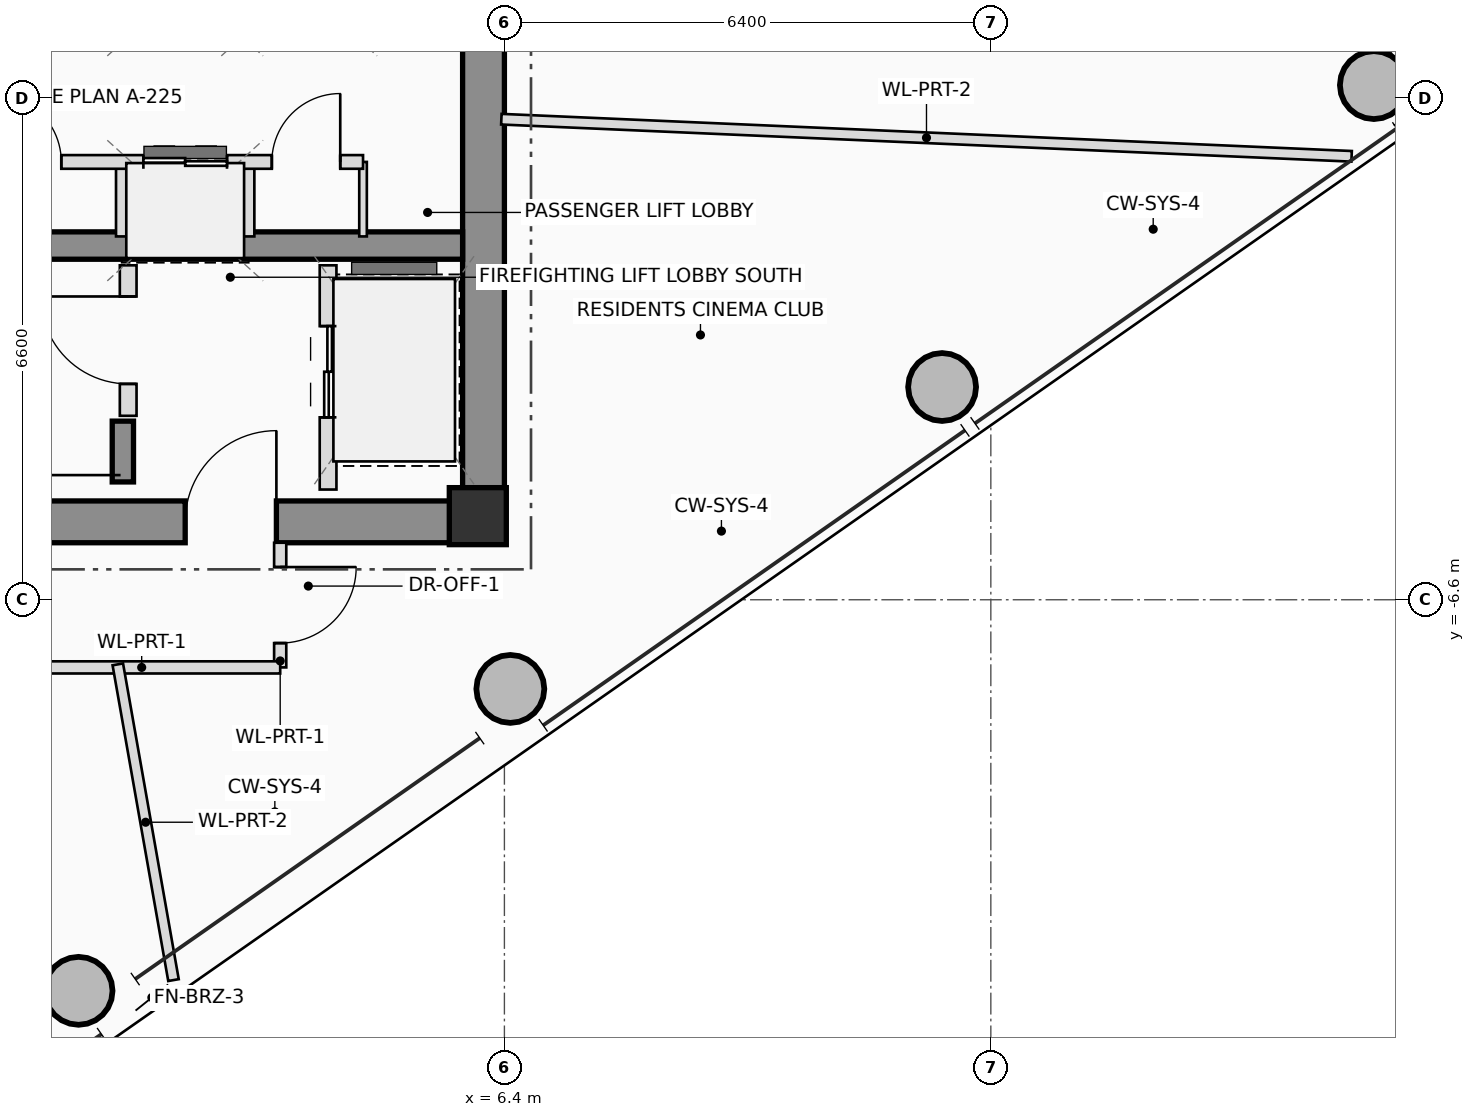
"""IFC4 building model, lengths in metres.
Left out: names, types, materials, properties, quantities, classifications, styles, units other than length and angle.
Written with IfcOpenShell. Run it as: python <this file> out.ifc"""

import sys

from ifc_helpers import new_model, si_unit, direction, frame, frame_2d, origin, origin_2d, place, context, subcontext, project, spatial, rectangle, hollow_circle, extrude, source, transform, mapped, element, fill, save


model = new_model("IFC4")
c1 = context("Model", 3, precision=1e-05, world=origin(), true_north=direction((0.0, 1.0)))
c2 = subcontext(c1, "Body", "Model", "MODEL_VIEW")
j1 = project(units=[si_unit("LENGTHUNIT", "METRE"), si_unit("PLANEANGLEUNIT", "RADIAN")], contexts=[c1])
p1 = place(None, origin())
s1 = spatial("IfcSite", under=j1, at=p1, CompositionType="ELEMENT")
p2 = place(p1, origin())
s2 = spatial("IfcBuilding", under=s1, at=p2, CompositionType="ELEMENT")
p3 = place(p2, frame((0.0, 0.0, 274.55)))
s3 = spatial("IfcBuildingStorey", under=s2, at=p3, CompositionType="ELEMENT", Elevation=274.55)
m1 = source(origin(), c2, "Body", "SweptSolid", [
    extrude(rectangle(XDim=0.75, YDim=0.75, at=origin_2d()), origin(), (0.0, 0.0, 1.0), 3.4),
])
p4 = place(p3, frame((6.05, -5.5, 0.0), z_axis=(0.0, 0.0, 1.0), x_axis=(1.0, 0.0, 0.0)))
e1 = element("IfcColumn", 1, at=p4, inside=s3, PredefinedType="COLUMN", context=c2, shape_type="MappedRepresentation", body=[
    mapped(m1, transform((0.0, 0.0, 0.0), scale=1.0)),
])
p5 = place(p3, frame((-6.4, -5.575, 0.0), z_axis=(0.0, 0.0, 1.0), x_axis=(1.0, 0.0, 0.0)))
e2 = element("IfcWall", 2, at=p5, inside=s3, PredefinedType="SHEAR", context=c2, shape_type="SweptSolid", body=[
    extrude(rectangle(XDim=12.8, YDim=0.55, at=frame_2d((6.4, 0.0))), origin(), (0.0, 0.0, 1.0), 3.4),
])
p6 = place(p5, frame((8.6, 0.0, 0.0)))
e3 = element("IfcOpeningElement", 3, at=p6, cuts=e2, PredefinedType="OPENING", context=c2, shape_type="SweptSolid", body=[
    extrude(rectangle(XDim=1.2, YDim=2.2, at=frame_2d((0.6, 1.1))), frame((0.0, 0.285, 0.0), z_axis=(0.0, -1.0, 0.0), x_axis=(1.0, 0.0, 0.0)), (0.0, 0.0, 1.0), 0.57),
])
p7 = place(p3, frame((6.125, -5.3, 0.0), z_axis=(0.0, 0.0, 1.0), x_axis=(0.0, 1.0, 0.0)))
e4 = element("IfcWall", 4, at=p7, inside=s3, PredefinedType="SHEAR", context=c2, shape_type="SweptSolid", body=[
    extrude(rectangle(XDim=10.6, YDim=0.55, at=frame_2d((5.3, 0.0))), origin(), (0.0, 0.0, 1.0), 3.4),
])
p8 = place(p3, frame((-5.85, -1.94, 0.0), z_axis=(0.0, 0.0, 1.0), x_axis=(1.0, 0.0, 0.0)))
e5 = element("IfcWall", 5, at=p8, inside=s3, PredefinedType="SHEAR", context=c2, shape_type="SweptSolid", body=[
    extrude(rectangle(XDim=11.7, YDim=0.36, at=frame_2d((5.85, 0.0))), origin(), (0.0, 0.0, 1.0), 3.4),
])
p9 = place(p3, frame((1.38, -5.05, 0.0), z_axis=(0.0, 0.0, 1.0), x_axis=(0.0, 1.0, 0.0)))
e6 = element("IfcWall", 6, at=p9, inside=s3, PredefinedType="SHEAR", context=c2, shape_type="SweptSolid", body=[
    extrude(rectangle(XDim=0.8, YDim=0.28, at=frame_2d((0.4, 0.0))), origin(), (0.0, 0.0, 1.0), 3.4),
])
m2 = source(origin(), c2, "Body", "SweptSolid", [
    extrude(hollow_circle(Radius=0.45, WallThickness=0.032, at=origin_2d()), origin(), (0.0, 0.0, 1.0), 3.4),
])
for number, where, z_axis, x_axis in (
    (7, (0.797, -11.745, 0.0), (0.0, 0.0, 1.0), (1.0, 0.0, 0.0)),
    (8, (6.478, -7.773, 0.0), (0.0, 0.0, 1.0), (1.0, 0.0, 0.0)),
    (9, (12.159, -3.801, 0.0), (0.0, 0.0, 1.0), (1.0, 0.0, 0.0)),
    (10, (17.84, 0.171, 0.0), (0.0, 0.0, 1.0), (1.0, 0.0, 0.0)),
):
    element("IfcColumn", number, at=place(p3, frame(where, z_axis=z_axis, x_axis=x_axis)), inside=s3, PredefinedType="COLUMN", context=c2, shape_type="MappedRepresentation", body=[
        mapped(m2, transform((0.0, 0.0, 0.0), scale=1.0)),
    ])
p10 = place(p3, frame((1.45, -4.18, 0.0), z_axis=(0.0, 0.0, 1.0), x_axis=(0.0, 1.0, 0.0)))
e11 = element("IfcWall", 11, at=p10, inside=s3, PredefinedType="PLUMBINGWALL", context=c2, shape_type="SweptSolid", body=[
    extrude(rectangle(XDim=1.98, YDim=0.22, at=frame_2d((0.99, 0.0))), origin(), (0.0, 0.0, 1.0), 3.2),
])
p11 = place(p10, frame((0.42, 0.0, 0.0)))
e12 = element("IfcOpeningElement", 12, at=p11, cuts=e11, PredefinedType="OPENING", context=c2, shape_type="SweptSolid", body=[
    extrude(rectangle(XDim=1.15, YDim=2.15, at=frame_2d((0.575, 1.075))), frame((0.0, 0.12, 0.0), z_axis=(0.0, -1.0, 0.0), x_axis=(1.0, 0.0, 0.0)), (0.0, 0.0, 1.0), 0.24),
])
p12 = place(p3, frame((4.08, -5.15, 0.0), z_axis=(0.0, 0.0, 1.0), x_axis=(0.0, 1.0, 0.0)))
e13 = element("IfcWall", 13, at=p12, inside=s3, PredefinedType="PLUMBINGWALL", context=c2, shape_type="SweptSolid", body=[
    extrude(rectangle(XDim=2.95, YDim=0.22, at=frame_2d((1.475, 0.0))), origin(), (0.0, 0.0, 1.0), 3.2),
])
p13 = place(p12, frame((0.95, 0.0, 0.0)))
e14 = element("IfcOpeningElement", 14, at=p13, cuts=e13, PredefinedType="OPENING", context=c2, shape_type="SweptSolid", body=[
    extrude(rectangle(XDim=1.2, YDim=2.25, at=frame_2d((0.6, 1.125))), frame((0.0, 0.12, 0.0), z_axis=(0.0, -1.0, 0.0), x_axis=(1.0, 0.0, 0.0)), (0.0, 0.0, 1.0), 0.24),
])
for number, where, z_axis, x_axis in (
    (15, (1.38, -1.82, 0.0), (0.0, 0.0, 1.0), (0.0, 1.0, 0.0)),
    (16, (3.02, -1.82, 0.0), (0.0, 0.0, 1.0), (0.0, 1.0, 0.0)),
):
    element("IfcWall", number, at=place(p3, frame(where, z_axis=z_axis, x_axis=x_axis)), inside=s3, PredefinedType="PLUMBINGWALL", context=c2, shape_type="SweptSolid", body=[
        extrude(rectangle(XDim=0.98, YDim=0.18, at=frame_2d((0.49, 0.0))), origin(), (0.0, 0.0, 1.0), 3.2),
    ])
p14 = place(p3, frame((4.54, -1.82, 0.0), z_axis=(0.0, 0.0, 1.0), x_axis=(0.0, 1.0, 0.0)))
e17 = element("IfcWall", 17, at=p14, inside=s3, PredefinedType="PARTITIONING", context=c2, shape_type="SweptSolid", body=[
    extrude(rectangle(XDim=0.98, YDim=0.1, at=frame_2d((0.49, 0.0))), origin(), (0.0, 0.0, 1.0), 3.2),
])
p15 = place(p3, frame((-5.68, -0.84, 0.0), z_axis=(0.0, 0.0, 1.0), x_axis=(1.0, 0.0, 0.0)))
e18 = element("IfcWall", 18, at=p15, inside=s3, PredefinedType="PLUMBINGWALL", context=c2, shape_type="SweptSolid", body=[
    extrude(rectangle(XDim=10.22, YDim=0.18, at=frame_2d((5.11, 0.0))), origin(), (0.0, 0.0, 1.0), 3.2),
])
p16 = place(p15, frame((1.88, 0.0, 0.0)))
e19 = element("IfcOpeningElement", 19, at=p16, cuts=e18, PredefinedType="OPENING", context=c2, shape_type="SweptSolid", body=[
    extrude(rectangle(XDim=0.9, YDim=2.05, at=frame_2d((0.45, 1.025))), frame((0.0, 0.1, 0.0), z_axis=(0.0, -1.0, 0.0), x_axis=(1.0, 0.0, 0.0)), (0.0, 0.0, 1.0), 0.2),
])
p17 = place(p15, frame((5.35, 0.0, 0.0)))
e20 = element("IfcOpeningElement", 20, at=p17, cuts=e18, PredefinedType="OPENING", context=c2, shape_type="SweptSolid", body=[
    extrude(rectangle(XDim=0.9, YDim=2.05, at=frame_2d((0.45, 1.025))), frame((0.0, 0.1, 0.0), z_axis=(0.0, -1.0, 0.0), x_axis=(1.0, 0.0, 0.0)), (0.0, 0.0, 1.0), 0.2),
])
p18 = place(p15, frame((7.33, 0.0, 0.0)))
e21 = element("IfcOpeningElement", 21, at=p18, cuts=e18, PredefinedType="OPENING", context=c2, shape_type="SweptSolid", body=[
    extrude(rectangle(XDim=1.1, YDim=2.2, at=frame_2d((0.55, 1.1))), frame((0.0, 0.1, 0.0), z_axis=(0.0, -1.0, 0.0), x_axis=(1.0, 0.0, 0.0)), (0.0, 0.0, 1.0), 0.2),
])
p19 = place(p15, frame((9.02, 0.0, 0.0)))
e22 = element("IfcOpeningElement", 22, at=p19, cuts=e18, PredefinedType="OPENING", context=c2, shape_type="SweptSolid", body=[
    extrude(rectangle(XDim=0.9, YDim=2.05, at=frame_2d((0.45, 1.025))), frame((0.0, 0.1, 0.0), z_axis=(0.0, -1.0, 0.0), x_axis=(1.0, 0.0, 0.0)), (0.0, 0.0, 1.0), 0.2),
])
p20 = place(p3, frame((3.45, -5.85, 0.0), z_axis=(0.0, 0.0, 1.0), x_axis=(0.0, -1.0, 0.0)))
e23 = element("IfcWall", 23, at=p20, inside=s3, PredefinedType="PARTITIONING", context=c2, shape_type="SweptSolid", body=[
    extrude(rectangle(XDim=1.64, YDim=0.16, at=frame_2d((0.82, 0.0))), origin(), (0.0, 0.0, 1.0), 3.2),
])
p21 = place(p20, frame((0.32, 0.0, 0.0)))
e24 = element("IfcOpeningElement", 24, at=p21, cuts=e23, PredefinedType="OPENING", context=c2, shape_type="SweptSolid", body=[
    extrude(rectangle(XDim=1.0, YDim=2.25, at=frame_2d((0.5, 1.125))), frame((0.0, 0.09, 0.0), z_axis=(0.0, -1.0, 0.0), x_axis=(1.0, 0.0, 0.0)), (0.0, 0.0, 1.0), 0.18),
])
p22 = place(p3, frame((3.45, -7.49, 0.0), z_axis=(0.0, 0.0, 1.0), x_axis=(-1.0, 0.0, 0.0)))
e25 = element("IfcWall", 25, at=p22, inside=s3, PredefinedType="PARTITIONING", context=c2, shape_type="SweptSolid", body=[
    extrude(rectangle(XDim=9.81, YDim=0.16, at=frame_2d((4.905, 0.0))), origin(), (0.0, 0.0, 1.0), 2.605),
])
p23 = place(p22, frame((3.795, 0.0, 0.0)))
e26 = element("IfcOpeningElement", 26, at=p23, cuts=e25, PredefinedType="OPENING", context=c2, shape_type="SweptSolid", body=[
    extrude(rectangle(XDim=1.0, YDim=2.25, at=frame_2d((0.5, 1.125))), frame((0.0, 0.09, 0.0), z_axis=(0.0, -1.0, 0.0), x_axis=(1.0, 0.0, 0.0)), (0.0, 0.0, 1.0), 0.18),
])
p24 = place(p22, frame((7.553, 0.0, 0.0)))
e27 = element("IfcOpeningElement", 27, at=p24, cuts=e25, PredefinedType="OPENING", context=c2, shape_type="SweptSolid", body=[
    extrude(rectangle(XDim=1.0, YDim=2.25, at=frame_2d((0.5, 1.125))), frame((0.0, 0.09, 0.0), z_axis=(0.0, -1.0, 0.0), x_axis=(1.0, 0.0, 0.0)), (0.0, 0.0, 1.0), 0.18),
])
p25 = place(p3, frame((6.36, -0.278, 0.0), z_axis=(0.0, 0.0, 1.0), x_axis=(0.999047788643, -0.043629302162, 0.0)))
e28 = element("IfcWall", 28, at=p25, inside=s3, PredefinedType="PARTITIONING", context=c2, shape_type="SweptSolid", body=[
    extrude(rectangle(XDim=11.197, YDim=0.14, at=frame_2d((5.599, 0.0))), origin(), (0.0, 0.0, 1.0), 2.765),
])
p26 = place(p3, frame((1.314, -7.45, 0.0), z_axis=(0.0, 0.0, 1.0), x_axis=(0.17364664795, -0.984808022741, 0.0)))
e29 = element("IfcWall", 29, at=p26, inside=s3, PredefinedType="PARTITIONING", context=c2, shape_type="SweptSolid", body=[
    extrude(rectangle(XDim=4.218, YDim=0.14, at=frame_2d((2.109, 0.0))), origin(), (0.0, 0.0, 1.0), 2.605),
])
p27 = place(p6, origin())
e30 = element("IfcDoor", 30, at=p27, inside=s3, OperationType="SINGLE_SWING_RIGHT", PredefinedType="DOOR", context=c2, shape_type="SweptSolid", body=[
    extrude(rectangle(XDim=1.2, YDim=2.2, at=frame_2d((0.6, 1.1))), frame((0.0, 0.025, 0.0), z_axis=(0.0, -1.0, 0.0), x_axis=(1.0, 0.0, 0.0)), (0.0, 0.0, 1.0), 0.05),
])
fill(e3, e30)
p28 = place(p11, origin())
e31 = element("IfcDoor", 31, at=p28, inside=s3, OperationType="SINGLE_SWING_RIGHT", PredefinedType="DOOR", context=c2, shape_type="SweptSolid", body=[
    extrude(rectangle(XDim=1.15, YDim=2.15, at=frame_2d((0.575, 1.075))), frame((0.0, 0.025, 0.0), z_axis=(0.0, -1.0, 0.0), x_axis=(1.0, 0.0, 0.0)), (0.0, 0.0, 1.0), 0.05),
])
fill(e12, e31)
p29 = place(p13, origin())
e32 = element("IfcDoor", 32, at=p29, inside=s3, OperationType="DOUBLE_DOOR_SLIDING", PredefinedType="DOOR", context=c2, shape_type="SweptSolid", body=[
    extrude(rectangle(XDim=1.2, YDim=2.25, at=frame_2d((0.6, 1.125))), frame((0.0, 0.025, 0.0), z_axis=(0.0, -1.0, 0.0), x_axis=(1.0, 0.0, 0.0)), (0.0, 0.0, 1.0), 0.05),
])
fill(e14, e32)
p30 = place(p17, origin())
e33 = element("IfcDoor", 33, at=p30, inside=s3, OperationType="SINGLE_SWING_LEFT", PredefinedType="DOOR", context=c2, shape_type="SweptSolid", body=[
    extrude(rectangle(XDim=0.9, YDim=2.05, at=frame_2d((0.45, 1.025))), frame((0.0, 0.025, 0.0), z_axis=(0.0, -1.0, 0.0), x_axis=(1.0, 0.0, 0.0)), (0.0, 0.0, 1.0), 0.05),
])
fill(e20, e33)
p31 = place(p18, origin())
e34 = element("IfcDoor", 34, at=p31, inside=s3, OperationType="DOUBLE_DOOR_SLIDING", PredefinedType="DOOR", context=c2, shape_type="SweptSolid", body=[
    extrude(rectangle(XDim=1.1, YDim=2.2, at=frame_2d((0.55, 1.1))), frame((0.0, 0.025, 0.0), z_axis=(0.0, -1.0, 0.0), x_axis=(1.0, 0.0, 0.0)), (0.0, 0.0, 1.0), 0.05),
])
fill(e21, e34)
p32 = place(p19, origin())
e35 = element("IfcDoor", 35, at=p32, inside=s3, OperationType="SINGLE_SWING_RIGHT", PredefinedType="DOOR", context=c2, shape_type="SweptSolid", body=[
    extrude(rectangle(XDim=0.9, YDim=2.05, at=frame_2d((0.45, 1.025))), frame((0.0, 0.025, 0.0), z_axis=(0.0, -1.0, 0.0), x_axis=(1.0, 0.0, 0.0)), (0.0, 0.0, 1.0), 0.05),
])
fill(e22, e35)
p33 = place(p21, origin())
e36 = element("IfcDoor", 36, at=p33, inside=s3, OperationType="SINGLE_SWING_LEFT", PredefinedType="DOOR", context=c2, shape_type="SweptSolid", body=[
    extrude(rectangle(XDim=1.0, YDim=2.25, at=frame_2d((0.5, 1.125))), frame((0.0, 0.025, 0.0), z_axis=(0.0, -1.0, 0.0), x_axis=(1.0, 0.0, 0.0)), (0.0, 0.0, 1.0), 0.05),
])
fill(e24, e36)
save(model, sys.argv[1])
